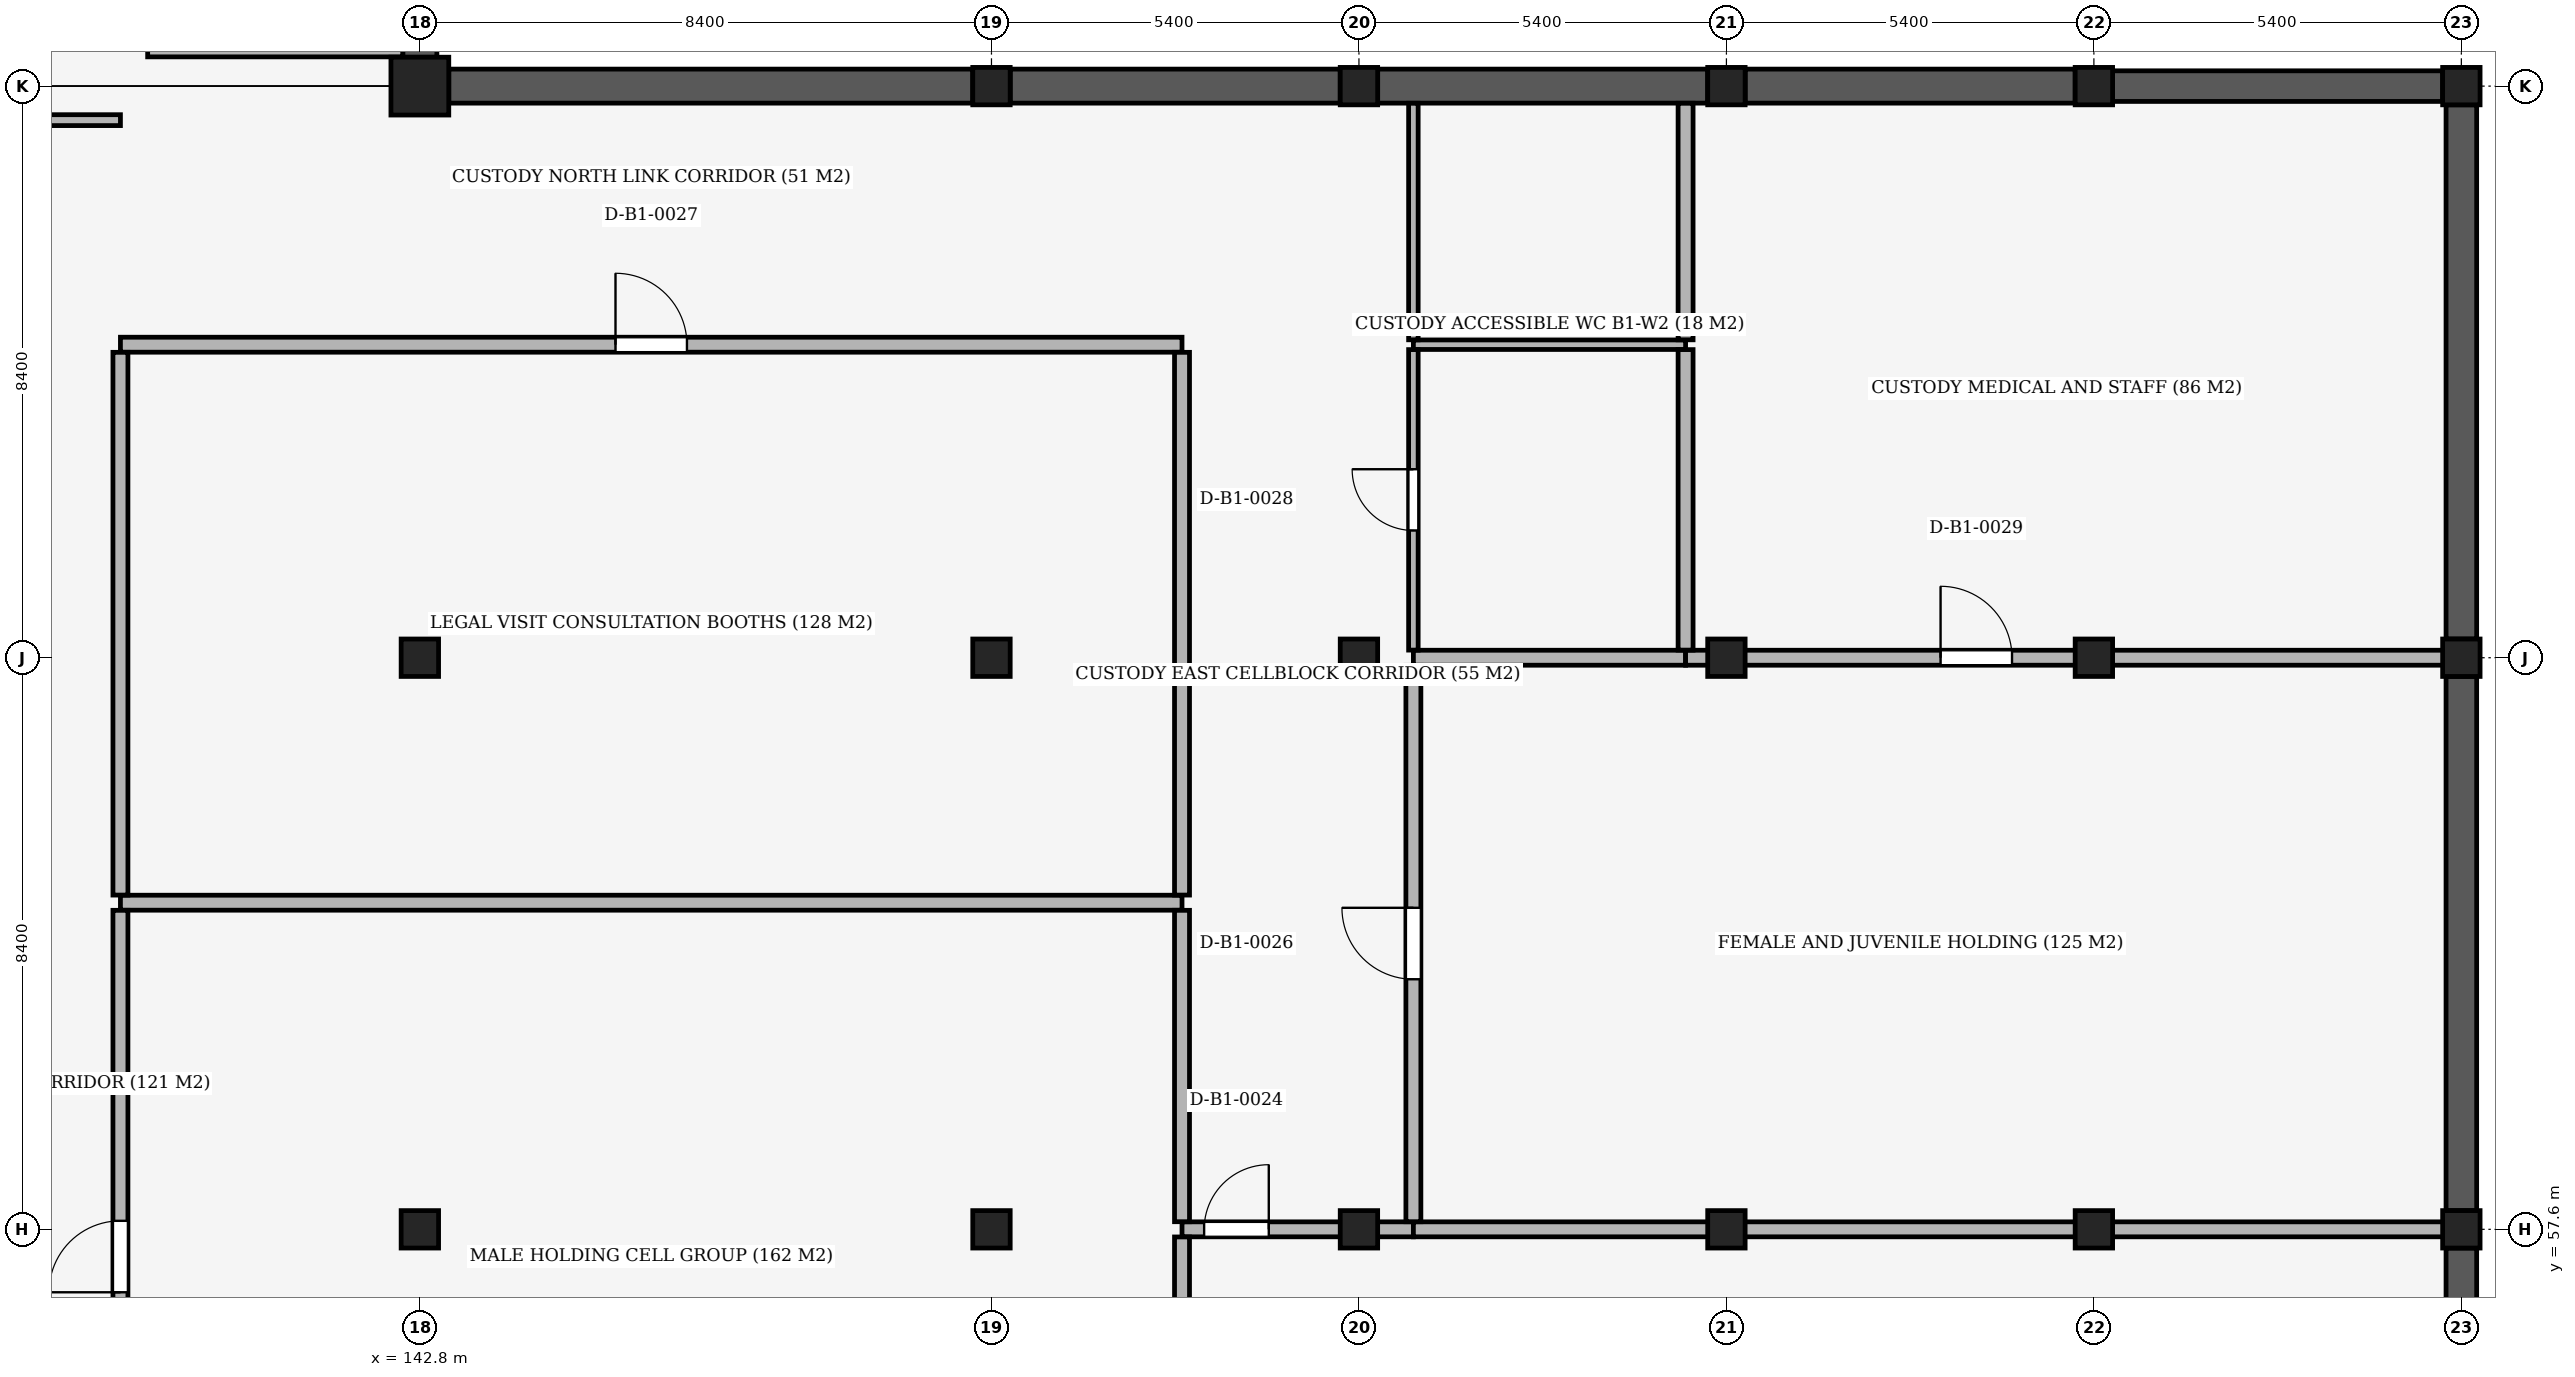
"""IFC4 building model, lengths in metres.
Left out: names, types, materials, properties, quantities, classifications, styles, units other than length and angle.
Written with IfcOpenShell. Run it as: python <this file> out.ifc"""

import sys

from ifc_helpers import new_model, si_unit, direction, frame, frame_2d, origin, origin_2d, place, context, subcontext, project, spatial, rectangle, extrude, element, fill, save


model = new_model("IFC4")
c1 = context("Model", 3, precision=1e-05, world=origin(), true_north=direction((0.0, 1.0)))
c2 = subcontext(c1, "Body", "Model", "MODEL_VIEW")
j1 = project(units=[si_unit("LENGTHUNIT", "METRE"), si_unit("PLANEANGLEUNIT", "RADIAN")], contexts=[c1])
p1 = place(None, origin())
s1 = spatial("IfcSite", under=j1, at=p1, CompositionType="ELEMENT")
p2 = place(p1, origin())
s2 = spatial("IfcBuilding", under=s1, at=p2, CompositionType="ELEMENT")
p3 = place(p2, frame((0.0, 0.0, -4.8)))
s3 = spatial("IfcBuildingStorey", under=s2, at=p3, CompositionType="ELEMENT", Elevation=-4.8)
for number, where, z_axis, x_axis in (
    (1, (142.8, 57.6, 0.0), (0.0, 0.0, 1.0), (1.0, 0.0, 0.0)),
    (2, (142.8, 66.0, 0.0), (0.0, 0.0, 1.0), (1.0, 0.0, 0.0)),
):
    element("IfcColumn", number, at=place(p3, frame(where, z_axis=z_axis, x_axis=x_axis)), inside=s3, PredefinedType="COLUMN", context=c2, shape_type="SweptSolid", body=[
        extrude(rectangle(XDim=0.55, YDim=0.55, at=origin_2d()), origin(), (0.0, 0.0, 1.0), 4.8),
    ])
p4 = place(p3, frame((142.8, 74.4, 0.0), z_axis=(0.0, 0.0, 1.0), x_axis=(1.0, 0.0, 0.0)))
e3 = element("IfcColumn", 3, at=p4, inside=s3, PredefinedType="COLUMN", context=c2, shape_type="SweptSolid", body=[
    extrude(rectangle(XDim=0.85, YDim=0.85, at=origin_2d()), origin(), (0.0, 0.0, 1.0), 4.8),
])
for number, where, z_axis, x_axis in (
    (4, (151.2, 57.6, 0.0), (0.0, 0.0, 1.0), (1.0, 0.0, 0.0)),
    (5, (151.2, 66.0, 0.0), (0.0, 0.0, 1.0), (1.0, 0.0, 0.0)),
    (6, (151.2, 74.4, 0.0), (0.0, 0.0, 1.0), (1.0, 0.0, 0.0)),
    (7, (156.6, 57.6, 0.0), (0.0, 0.0, 1.0), (1.0, 0.0, 0.0)),
    (8, (156.6, 66.0, 0.0), (0.0, 0.0, 1.0), (1.0, 0.0, 0.0)),
    (9, (156.6, 74.4, 0.0), (0.0, 0.0, 1.0), (1.0, 0.0, 0.0)),
    (10, (162.0, 57.6, 0.0), (0.0, 0.0, 1.0), (1.0, 0.0, 0.0)),
    (11, (162.0, 66.0, 0.0), (0.0, 0.0, 1.0), (1.0, 0.0, 0.0)),
    (12, (162.0, 74.4, 0.0), (0.0, 0.0, 1.0), (1.0, 0.0, 0.0)),
    (13, (167.4, 57.6, 0.0), (0.0, 0.0, 1.0), (1.0, 0.0, 0.0)),
    (14, (167.4, 66.0, 0.0), (0.0, 0.0, 1.0), (1.0, 0.0, 0.0)),
    (15, (167.4, 74.4, 0.0), (0.0, 0.0, 1.0), (1.0, 0.0, 0.0)),
    (16, (172.8, 57.6, 0.0), (0.0, 0.0, 1.0), (1.0, 0.0, 0.0)),
    (17, (172.8, 66.0, 0.0), (0.0, 0.0, 1.0), (1.0, 0.0, 0.0)),
    (18, (172.8, 74.4, 0.0), (0.0, 0.0, 1.0), (1.0, 0.0, 0.0)),
):
    element("IfcColumn", number, at=place(p3, frame(where, z_axis=z_axis, x_axis=x_axis)), inside=s3, PredefinedType="COLUMN", context=c2, shape_type="SweptSolid", body=[
        extrude(rectangle(XDim=0.55, YDim=0.55, at=origin_2d()), origin(), (0.0, 0.0, 1.0), 4.8),
    ])
p5 = place(p3, frame((142.8, 79.375, 0.0), z_axis=(0.0, 0.0, 1.0), x_axis=(0.0, -1.0, 0.0)))
e19 = element("IfcWall", 19, at=p5, inside=s3, PredefinedType="USERDEFINED", context=c2, shape_type="SweptSolid", body=[
    extrude(rectangle(XDim=4.55, YDim=0.5, at=frame_2d((2.275, 0.0))), origin(), (0.0, 0.0, 1.0), 3.85),
])
p6 = place(p3, frame((143.225, 74.4, 0.0), z_axis=(0.0, 0.0, 1.0), x_axis=(1.0, 0.0, 0.0)))
e20 = element("IfcWall", 20, at=p6, inside=s3, PredefinedType="USERDEFINED", context=c2, shape_type="SweptSolid", body=[
    extrude(rectangle(XDim=7.7, YDim=0.5, at=frame_2d((3.85, 0.0))), origin(), (0.0, 0.0, 1.0), 3.75),
])
p7 = place(p3, frame((151.475, 74.4, 0.0), z_axis=(0.0, 0.0, 1.0), x_axis=(1.0, 0.0, 0.0)))
e21 = element("IfcWall", 21, at=p7, inside=s3, PredefinedType="USERDEFINED", context=c2, shape_type="SweptSolid", body=[
    extrude(rectangle(XDim=4.85, YDim=0.5, at=frame_2d((2.425, 0.0))), origin(), (0.0, 0.0, 1.0), 3.9),
])
for number, where, z_axis, x_axis in (
    (22, (156.875, 74.4, 0.0), (0.0, 0.0, 1.0), (1.0, 0.0, 0.0)),
    (23, (162.275, 74.4, 0.0), (0.0, 0.0, 1.0), (1.0, 0.0, 0.0)),
):
    element("IfcWall", number, at=place(p3, frame(where, z_axis=z_axis, x_axis=x_axis)), inside=s3, PredefinedType="USERDEFINED", context=c2, shape_type="SweptSolid", body=[
        extrude(rectangle(XDim=4.85, YDim=0.5, at=frame_2d((2.425, 0.0))), origin(), (0.0, 0.0, 1.0), 3.9),
    ])
p8 = place(p3, frame((167.675, 74.4, 0.0), z_axis=(0.0, 0.0, 1.0), x_axis=(1.0, 0.0, 0.0)))
e24 = element("IfcWall", 24, at=p8, inside=s3, PredefinedType="USERDEFINED", context=c2, shape_type="SweptSolid", body=[
    extrude(rectangle(XDim=4.85, YDim=0.45, at=frame_2d((2.425, 0.0))), origin(), (0.0, 0.0, 1.0), 3.9),
])
for number, where, z_axis, x_axis in (
    (25, (172.8, 74.125, 0.0), (0.0, 0.0, 1.0), (0.0, -1.0, 0.0)),
    (26, (172.8, 65.725, 0.0), (0.0, 0.0, 1.0), (0.0, -1.0, 0.0)),
):
    element("IfcWall", number, at=place(p3, frame(where, z_axis=z_axis, x_axis=x_axis)), inside=s3, PredefinedType="USERDEFINED", context=c2, shape_type="SweptSolid", body=[
        extrude(rectangle(XDim=7.85, YDim=0.45, at=frame_2d((3.925, 0.0))), origin(), (0.0, 0.0, 1.0), 3.7),
    ])
p9 = place(p3, frame((172.8, 57.325, 0.0), z_axis=(0.0, 0.0, 1.0), x_axis=(0.0, -1.0, 0.0)))
e27 = element("IfcWall", 27, at=p9, inside=s3, PredefinedType="USERDEFINED", context=c2, shape_type="SweptSolid", body=[
    extrude(rectangle(XDim=7.85, YDim=0.45, at=frame_2d((3.925, 0.0))), origin(), (0.0, 0.0, 1.0), 3.7),
])
p10 = place(p9, frame((1.825, 0.0, 0.0)))
e28 = element("IfcOpeningElement", 28, at=p10, cuts=e27, PredefinedType="OPENING", context=c2, shape_type="SweptSolid", body=[
    extrude(rectangle(XDim=4.2, YDim=3.65, at=frame_2d((2.1, 1.825))), frame((0.0, 0.24, 0.0), z_axis=(0.0, -1.0, 0.0), x_axis=(1.0, 0.0, 0.0)), (0.0, 0.0, 1.0), 0.48),
])
p11 = place(p3, frame((154.0, 57.6, 0.0), z_axis=(0.0, 0.0, 1.0), x_axis=(1.0, 0.0, 0.0)))
e29 = element("IfcWall", 29, at=p11, inside=s3, PredefinedType="PARTITIONING", context=c2, shape_type="SweptSolid", body=[
    extrude(rectangle(XDim=3.4, YDim=0.22, at=frame_2d((1.7, 0.0))), origin(), (0.0, 0.0, 1.0), 3.7),
])
p12 = place(p11, frame((0.325, 0.0, 0.0)))
e30 = element("IfcOpeningElement", 30, at=p12, cuts=e29, PredefinedType="OPENING", context=c2, shape_type="SweptSolid", body=[
    extrude(rectangle(XDim=0.95, YDim=2.1, at=frame_2d((0.475, 1.05))), frame((0.0, 0.125, 0.0), z_axis=(0.0, -1.0, 0.0), x_axis=(1.0, 0.0, 0.0)), (0.0, 0.0, 1.0), 0.25),
])
p13 = place(p3, frame((157.4, 57.6, 0.0), z_axis=(0.0, 0.0, 1.0), x_axis=(1.0, 0.0, 0.0)))
e31 = element("IfcWall", 31, at=p13, inside=s3, PredefinedType="PARTITIONING", context=c2, shape_type="SweptSolid", body=[
    extrude(rectangle(XDim=15.344, YDim=0.22, at=frame_2d((7.672, 0.0))), origin(), (0.0, 0.0, 1.0), 3.7),
])
p14 = place(p3, frame((138.4, 62.4, 0.0), z_axis=(0.0, 0.0, 1.0), x_axis=(1.0, 0.0, 0.0)))
e32 = element("IfcWall", 32, at=p14, inside=s3, PredefinedType="PARTITIONING", context=c2, shape_type="SweptSolid", body=[
    extrude(rectangle(XDim=15.6, YDim=0.22, at=frame_2d((7.8, 0.0))), origin(), (0.0, 0.0, 1.0), 3.7),
])
p15 = place(p3, frame((157.4, 66.0, 0.0), z_axis=(0.0, 0.0, 1.0), x_axis=(1.0, 0.0, 0.0)))
e33 = element("IfcWall", 33, at=p15, inside=s3, PredefinedType="PARTITIONING", context=c2, shape_type="SweptSolid", body=[
    extrude(rectangle(XDim=4.0, YDim=0.22, at=frame_2d((2.0, 0.0))), origin(), (0.0, 0.0, 1.0), 3.9),
])
p16 = place(p3, frame((161.4, 66.0, 0.0), z_axis=(0.0, 0.0, 1.0), x_axis=(1.0, 0.0, 0.0)))
e34 = element("IfcWall", 34, at=p16, inside=s3, PredefinedType="PARTITIONING", context=c2, shape_type="SweptSolid", body=[
    extrude(rectangle(XDim=11.344, YDim=0.22, at=frame_2d((5.672, 0.0))), origin(), (0.0, 0.0, 1.0), 3.7),
])
p17 = place(p16, frame((3.747, 0.0, 0.0)))
e35 = element("IfcOpeningElement", 35, at=p17, cuts=e34, PredefinedType="OPENING", context=c2, shape_type="SweptSolid", body=[
    extrude(rectangle(XDim=1.05, YDim=2.15, at=frame_2d((0.525, 1.075))), frame((0.0, 0.125, 0.0), z_axis=(0.0, -1.0, 0.0), x_axis=(1.0, 0.0, 0.0)), (0.0, 0.0, 1.0), 0.25),
])
p18 = place(p3, frame((138.4, 70.6, 0.0), z_axis=(0.0, 0.0, 1.0), x_axis=(1.0, 0.0, 0.0)))
e36 = element("IfcWall", 36, at=p18, inside=s3, PredefinedType="PARTITIONING", context=c2, shape_type="SweptSolid", body=[
    extrude(rectangle(XDim=15.6, YDim=0.22, at=frame_2d((7.8, 0.0))), origin(), (0.0, 0.0, 1.0), 3.7),
])
p19 = place(p18, frame((7.275, 0.0, 0.0)))
e37 = element("IfcOpeningElement", 37, at=p19, cuts=e36, PredefinedType="OPENING", context=c2, shape_type="SweptSolid", body=[
    extrude(rectangle(XDim=1.05, YDim=2.15, at=frame_2d((0.525, 1.075))), frame((0.0, 0.125, 0.0), z_axis=(0.0, -1.0, 0.0), x_axis=(1.0, 0.0, 0.0)), (0.0, 0.0, 1.0), 0.25),
])
p20 = place(p3, frame((157.4, 70.6, 0.0), z_axis=(0.0, 0.0, 1.0), x_axis=(1.0, 0.0, 0.0)))
e38 = element("IfcWall", 38, at=p20, inside=s3, PredefinedType="PARTITIONING", context=c2, shape_type="SweptSolid", body=[
    extrude(rectangle(XDim=4.0, YDim=0.14, at=frame_2d((2.0, 0.0))), origin(), (0.0, 0.0, 1.0), 4.5),
])
p21 = place(p3, frame((134.652, 73.9, 0.0), z_axis=(0.0, 0.0, 1.0), x_axis=(1.0, 0.0, 0.0)))
e39 = element("IfcWall", 39, at=p21, inside=s3, PredefinedType="PARTITIONING", context=c2, shape_type="SweptSolid", body=[
    extrude(rectangle(XDim=3.748, YDim=0.16, at=frame_2d((1.874, 0.0))), origin(), (0.0, 0.0, 1.0), 3.7),
])
p22 = place(p3, frame((138.8, 74.9, 0.0), z_axis=(0.0, 0.0, 1.0), x_axis=(1.0, 0.0, 0.0)))
e40 = element("IfcWall", 40, at=p22, inside=s3, PredefinedType="PARTITIONING", context=c2, shape_type="SweptSolid", body=[
    extrude(rectangle(XDim=3.748, YDim=0.14, at=frame_2d((1.874, 0.0))), origin(), (0.0, 0.0, 1.0), 3.85),
])
p23 = place(p3, frame((138.4, 52.112, 0.0), z_axis=(0.0, 0.0, 1.0), x_axis=(0.0, 1.0, 0.0)))
e41 = element("IfcWall", 41, at=p23, inside=s3, PredefinedType="PARTITIONING", context=c2, shape_type="SweptSolid", body=[
    extrude(rectangle(XDim=10.176, YDim=0.22, at=frame_2d((5.088, 0.0))), origin(), (0.0, 0.0, 1.0), 3.75),
])
p24 = place(p23, frame((4.563, 0.0, 0.0)))
e42 = element("IfcOpeningElement", 42, at=p24, cuts=e41, PredefinedType="OPENING", context=c2, shape_type="SweptSolid", body=[
    extrude(rectangle(XDim=1.05, YDim=2.15, at=frame_2d((0.525, 1.075))), frame((0.0, 0.125, 0.0), z_axis=(0.0, -1.0, 0.0), x_axis=(1.0, 0.0, 0.0)), (0.0, 0.0, 1.0), 0.25),
])
p25 = place(p3, frame((138.4, 62.512, 0.0), z_axis=(0.0, 0.0, 1.0), x_axis=(0.0, 1.0, 0.0)))
e43 = element("IfcWall", 43, at=p25, inside=s3, PredefinedType="PARTITIONING", context=c2, shape_type="SweptSolid", body=[
    extrude(rectangle(XDim=7.976, YDim=0.22, at=frame_2d((3.988, 0.0))), origin(), (0.0, 0.0, 1.0), 3.75),
])
p26 = place(p3, frame((154.0, 52.112, 0.0), z_axis=(0.0, 0.0, 1.0), x_axis=(0.0, 1.0, 0.0)))
e44 = element("IfcWall", 44, at=p26, inside=s3, PredefinedType="PARTITIONING", context=c2, shape_type="SweptSolid", body=[
    extrude(rectangle(XDim=5.376, YDim=0.22, at=frame_2d((2.688, 0.0))), origin(), (0.0, 0.0, 1.0), 3.9),
])
p27 = place(p3, frame((154.0, 57.712, 0.0), z_axis=(0.0, 0.0, 1.0), x_axis=(0.0, 1.0, 0.0)))
e45 = element("IfcWall", 45, at=p27, inside=s3, PredefinedType="PARTITIONING", context=c2, shape_type="SweptSolid", body=[
    extrude(rectangle(XDim=4.576, YDim=0.22, at=frame_2d((2.288, 0.0))), origin(), (0.0, 0.0, 1.0), 3.9),
])
p28 = place(p3, frame((154.0, 62.512, 0.0), z_axis=(0.0, 0.0, 1.0), x_axis=(0.0, 1.0, 0.0)))
e46 = element("IfcWall", 46, at=p28, inside=s3, PredefinedType="PARTITIONING", context=c2, shape_type="SweptSolid", body=[
    extrude(rectangle(XDim=7.976, YDim=0.22, at=frame_2d((3.988, 0.0))), origin(), (0.0, 0.0, 1.0), 3.9),
])
p29 = place(p3, frame((157.4, 70.672, 0.0), z_axis=(0.0, 0.0, 1.0), x_axis=(0.0, 1.0, 0.0)))
e47 = element("IfcWall", 47, at=p29, inside=s3, PredefinedType="PARTITIONING", context=c2, shape_type="SweptSolid", body=[
    extrude(rectangle(XDim=3.476, YDim=0.14, at=frame_2d((1.738, 0.0))), origin(), (0.0, 0.0, 1.0), 3.9),
])
p30 = place(p3, frame((157.4, 57.712, 0.0), z_axis=(0.0, 0.0, 1.0), x_axis=(0.0, 1.0, 0.0)))
e48 = element("IfcWall", 48, at=p30, inside=s3, PredefinedType="PARTITIONING", context=c2, shape_type="SweptSolid", body=[
    extrude(rectangle(XDim=8.176, YDim=0.22, at=frame_2d((4.088, 0.0))), origin(), (0.0, 0.0, 1.0), 3.9),
])
p31 = place(p30, frame((3.563, 0.0, 0.0)))
e49 = element("IfcOpeningElement", 49, at=p31, cuts=e48, PredefinedType="OPENING", context=c2, shape_type="SweptSolid", body=[
    extrude(rectangle(XDim=1.05, YDim=2.15, at=frame_2d((0.525, 1.075))), frame((0.0, 0.125, 0.0), z_axis=(0.0, -1.0, 0.0), x_axis=(1.0, 0.0, 0.0)), (0.0, 0.0, 1.0), 0.25),
])
p32 = place(p3, frame((157.4, 66.112, 0.0), z_axis=(0.0, 0.0, 1.0), x_axis=(0.0, 1.0, 0.0)))
e50 = element("IfcWall", 50, at=p32, inside=s3, PredefinedType="PARTITIONING", context=c2, shape_type="SweptSolid", body=[
    extrude(rectangle(XDim=4.416, YDim=0.14, at=frame_2d((2.208, 0.0))), origin(), (0.0, 0.0, 1.0), 3.9),
])
p33 = place(p32, frame((1.758, 0.0, 0.0)))
e51 = element("IfcOpeningElement", 51, at=p33, cuts=e50, PredefinedType="OPENING", context=c2, shape_type="SweptSolid", body=[
    extrude(rectangle(XDim=0.9, YDim=2.1, at=frame_2d((0.45, 1.05))), frame((0.0, 0.085, 0.0), z_axis=(0.0, -1.0, 0.0), x_axis=(1.0, 0.0, 0.0)), (0.0, 0.0, 1.0), 0.17),
])
p34 = place(p3, frame((161.4, 66.112, 0.0), z_axis=(0.0, 0.0, 1.0), x_axis=(0.0, 1.0, 0.0)))
e52 = element("IfcWall", 52, at=p34, inside=s3, PredefinedType="PARTITIONING", context=c2, shape_type="SweptSolid", body=[
    extrude(rectangle(XDim=4.416, YDim=0.22, at=frame_2d((2.208, 0.0))), origin(), (0.0, 0.0, 1.0), 3.9),
])
p35 = place(p3, frame((161.4, 70.672, 0.0), z_axis=(0.0, 0.0, 1.0), x_axis=(0.0, 1.0, 0.0)))
e53 = element("IfcWall", 53, at=p35, inside=s3, PredefinedType="PARTITIONING", context=c2, shape_type="SweptSolid", body=[
    extrude(rectangle(XDim=3.476, YDim=0.22, at=frame_2d((1.738, 0.0))), origin(), (0.0, 0.0, 1.0), 3.9),
])
p36 = place(p12, origin())
e54 = element("IfcDoor", 54, at=p36, inside=s3, OperationType="SINGLE_SWING_RIGHT", PredefinedType="DOOR", context=c2, shape_type="SweptSolid", body=[
    extrude(rectangle(XDim=0.95, YDim=2.1, at=frame_2d((0.475, 1.05))), frame((0.0, 0.025, 0.0), z_axis=(0.0, -1.0, 0.0), x_axis=(1.0, 0.0, 0.0)), (0.0, 0.0, 1.0), 0.05),
])
fill(e30, e54)
p37 = place(p24, origin())
e55 = element("IfcDoor", 55, at=p37, inside=s3, OperationType="SINGLE_SWING_LEFT", PredefinedType="DOOR", context=c2, shape_type="SweptSolid", body=[
    extrude(rectangle(XDim=1.05, YDim=2.15, at=frame_2d((0.525, 1.075))), frame((0.0, 0.025, 0.0), z_axis=(0.0, -1.0, 0.0), x_axis=(1.0, 0.0, 0.0)), (0.0, 0.0, 1.0), 0.05),
])
fill(e42, e55)
p38 = place(p31, origin())
e56 = element("IfcDoor", 56, at=p38, inside=s3, OperationType="SINGLE_SWING_RIGHT", PredefinedType="DOOR", context=c2, shape_type="SweptSolid", body=[
    extrude(rectangle(XDim=1.05, YDim=2.15, at=frame_2d((0.525, 1.075))), frame((0.0, 0.025, 0.0), z_axis=(0.0, -1.0, 0.0), x_axis=(1.0, 0.0, 0.0)), (0.0, 0.0, 1.0), 0.05),
])
fill(e49, e56)
p39 = place(p19, origin())
e57 = element("IfcDoor", 57, at=p39, inside=s3, OperationType="SINGLE_SWING_LEFT", PredefinedType="DOOR", context=c2, shape_type="SweptSolid", body=[
    extrude(rectangle(XDim=1.05, YDim=2.15, at=frame_2d((0.525, 1.075))), frame((0.0, 0.025, 0.0), z_axis=(0.0, -1.0, 0.0), x_axis=(1.0, 0.0, 0.0)), (0.0, 0.0, 1.0), 0.05),
])
fill(e37, e57)
p40 = place(p33, origin())
e58 = element("IfcDoor", 58, at=p40, inside=s3, OperationType="SINGLE_SWING_RIGHT", PredefinedType="DOOR", context=c2, shape_type="SweptSolid", body=[
    extrude(rectangle(XDim=0.9, YDim=2.1, at=frame_2d((0.45, 1.05))), frame((0.0, 0.025, 0.0), z_axis=(0.0, -1.0, 0.0), x_axis=(1.0, 0.0, 0.0)), (0.0, 0.0, 1.0), 0.05),
])
fill(e51, e58)
p41 = place(p17, origin())
e59 = element("IfcDoor", 59, at=p41, inside=s3, OperationType="SINGLE_SWING_LEFT", PredefinedType="DOOR", context=c2, shape_type="SweptSolid", body=[
    extrude(rectangle(XDim=1.05, YDim=2.15, at=frame_2d((0.525, 1.075))), frame((0.0, 0.025, 0.0), z_axis=(0.0, -1.0, 0.0), x_axis=(1.0, 0.0, 0.0)), (0.0, 0.0, 1.0), 0.05),
])
fill(e35, e59)
save(model, sys.argv[1])
